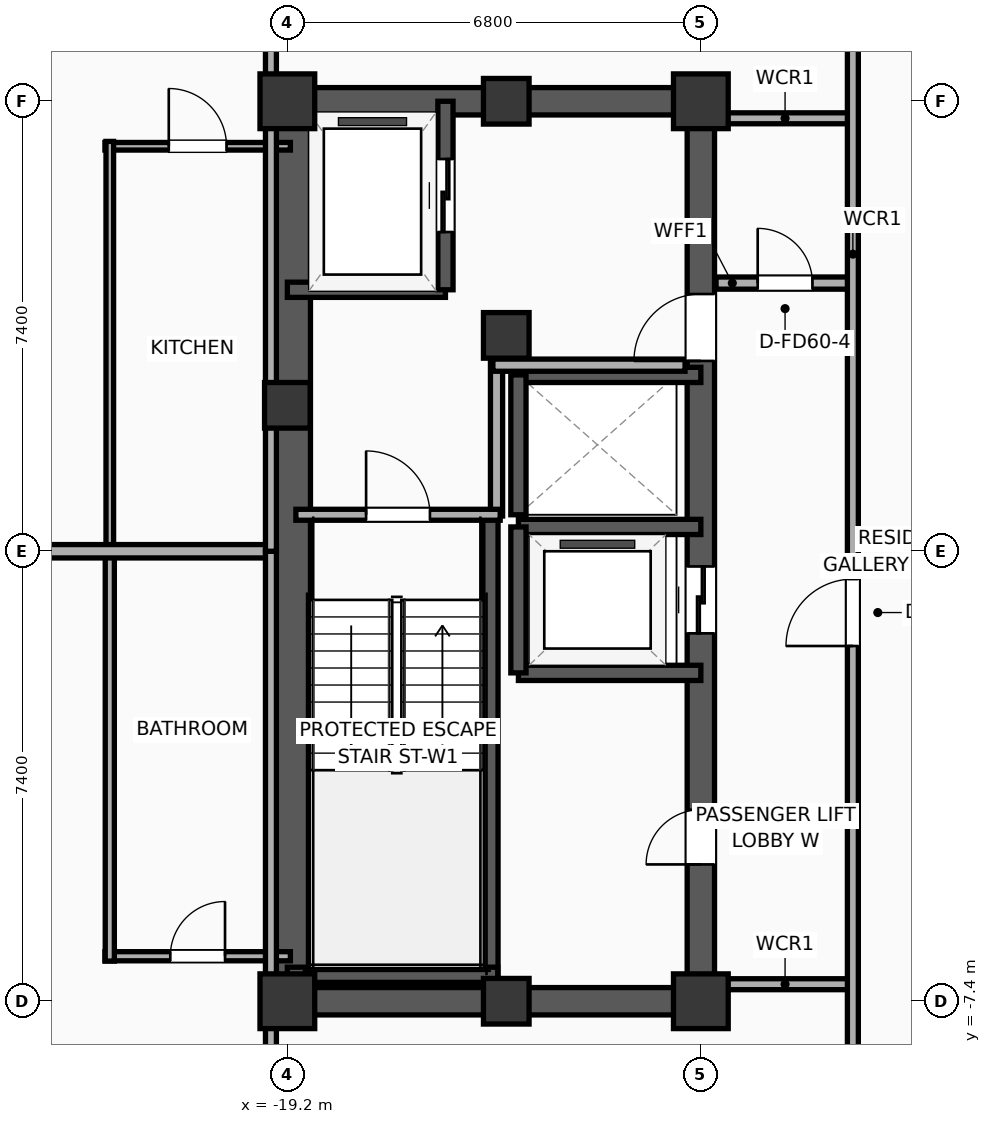
"""IFC4 building model, lengths in metres.
Left out: names, types, materials, properties, quantities, classifications, styles, units other than length and angle.
Written with IfcOpenShell. Run it as: python <this file> out.ifc"""

import sys

from ifc_helpers import new_model, si_unit, direction, frame, frame_2d, origin, origin_2d, place, context, subcontext, project, spatial, rectangle, extrude, element, fill, save


model = new_model("IFC4")
c1 = context("Model", 3, precision=1e-05, world=origin(), true_north=direction((0.0, 1.0)))
c2 = subcontext(c1, "Body", "Model", "MODEL_VIEW")
j1 = project(units=[si_unit("LENGTHUNIT", "METRE"), si_unit("PLANEANGLEUNIT", "RADIAN")], contexts=[c1])
p1 = place(None, origin())
s1 = spatial("IfcSite", under=j1, at=p1, CompositionType="ELEMENT")
p2 = place(p1, origin())
s2 = spatial("IfcBuilding", under=s1, at=p2, CompositionType="ELEMENT")
p3 = place(p2, frame((0.0, 0.0, 171.6)))
s3 = spatial("IfcBuildingStorey", under=s2, at=p3, CompositionType="ELEMENT", Elevation=171.6)
p4 = place(p3, frame((-19.2, -7.4, 0.0), z_axis=(0.0, 0.0, 1.0), x_axis=(1.0, 0.0, 0.0)))
e1 = element("IfcColumn", 1, at=p4, inside=s3, PredefinedType="COLUMN", context=c2, shape_type="SweptSolid", body=[
    extrude(rectangle(XDim=0.9, YDim=0.9, at=origin_2d()), origin(), (0.0, 0.0, 1.0), 3.9),
])
p5 = place(p3, frame((-19.2, 2.4, 0.0), z_axis=(0.0, 0.0, 1.0), x_axis=(1.0, 0.0, 0.0)))
e2 = element("IfcColumn", 2, at=p5, inside=s3, PredefinedType="COLUMN", context=c2, shape_type="SweptSolid", body=[
    extrude(rectangle(XDim=0.75, YDim=0.75, at=origin_2d()), origin(), (0.0, 0.0, 1.0), 3.9),
])
p6 = place(p3, frame((-19.2, 7.4, 0.0), z_axis=(0.0, 0.0, 1.0), x_axis=(1.0, 0.0, 0.0)))
e3 = element("IfcColumn", 3, at=p6, inside=s3, PredefinedType="COLUMN", context=c2, shape_type="SweptSolid", body=[
    extrude(rectangle(XDim=0.9, YDim=0.9, at=origin_2d()), origin(), (0.0, 0.0, 1.0), 3.9),
])
for number, where, z_axis, x_axis in (
    (4, (-15.6, -7.4, 0.0), (0.0, 0.0, 1.0), (1.0, 0.0, 0.0)),
    (5, (-15.6, 7.4, 0.0), (0.0, 0.0, 1.0), (1.0, 0.0, 0.0)),
):
    element("IfcColumn", number, at=place(p3, frame(where, z_axis=z_axis, x_axis=x_axis)), inside=s3, PredefinedType="COLUMN", context=c2, shape_type="SweptSolid", body=[
        extrude(rectangle(XDim=0.75, YDim=0.75, at=origin_2d()), origin(), (0.0, 0.0, 1.0), 3.9),
    ])
p7 = place(p3, frame((-12.4, -7.4, 0.0), z_axis=(0.0, 0.0, 1.0), x_axis=(1.0, 0.0, 0.0)))
e6 = element("IfcColumn", 6, at=p7, inside=s3, PredefinedType="COLUMN", context=c2, shape_type="SweptSolid", body=[
    extrude(rectangle(XDim=0.9, YDim=0.9, at=origin_2d()), origin(), (0.0, 0.0, 1.0), 3.9),
])
p8 = place(p3, frame((-15.6, 3.55, 0.0), z_axis=(0.0, 0.0, 1.0), x_axis=(1.0, 0.0, 0.0)))
e7 = element("IfcColumn", 7, at=p8, inside=s3, PredefinedType="COLUMN", context=c2, shape_type="SweptSolid", body=[
    extrude(rectangle(XDim=0.75, YDim=0.75, at=origin_2d()), origin(), (0.0, 0.0, 1.0), 3.9),
])
p9 = place(p3, frame((-12.4, 7.4, 0.0), z_axis=(0.0, 0.0, 1.0), x_axis=(1.0, 0.0, 0.0)))
e8 = element("IfcColumn", 8, at=p9, inside=s3, PredefinedType="COLUMN", context=c2, shape_type="SweptSolid", body=[
    extrude(rectangle(XDim=0.9, YDim=0.9, at=origin_2d()), origin(), (0.0, 0.0, 1.0), 3.9),
])
for number, where, z_axis, x_axis in (
    (9, (-19.425, -7.4, 0.0), (0.0, 0.0, 1.0), (1.0, 0.0, 0.0)),
    (10, (-19.425, 7.4, 0.0), (0.0, 0.0, 1.0), (1.0, 0.0, 0.0)),
):
    element("IfcWall", number, at=place(p3, frame(where, z_axis=z_axis, x_axis=x_axis)), inside=s3, PredefinedType="SHEAR", context=c2, shape_type="SweptSolid", body=[
        extrude(rectangle(XDim=7.25, YDim=0.45, at=frame_2d((3.625, 0.0))), origin(), (0.0, 0.0, 1.0), 3.65),
    ])
p10 = place(p3, frame((-19.145, -7.4, 0.0), z_axis=(0.0, 0.0, 1.0), x_axis=(0.0, 1.0, 0.0)))
e11 = element("IfcWall", 11, at=p10, inside=s3, PredefinedType="SHEAR", context=c2, shape_type="SweptSolid", body=[
    extrude(rectangle(XDim=14.8, YDim=0.65, at=frame_2d((7.4, 0.0))), origin(), (0.0, 0.0, 1.0), 3.65),
])
p11 = place(p3, frame((-12.4, -7.4, 0.0), z_axis=(0.0, 0.0, 1.0), x_axis=(0.0, 1.0, 0.0)))
e12 = element("IfcWall", 12, at=p11, inside=s3, PredefinedType="SHEAR", context=c2, shape_type="SweptSolid", body=[
    extrude(rectangle(XDim=14.8, YDim=0.45, at=frame_2d((7.4, 0.0))), origin(), (0.0, 0.0, 1.0), 3.65),
])
p12 = place(p11, frame((6.05, 0.0, 0.0)))
e13 = element("IfcOpeningElement", 13, at=p12, cuts=e12, PredefinedType="OPENING", context=c2, shape_type="SweptSolid", body=[
    extrude(rectangle(XDim=1.1, YDim=2.05, at=frame_2d((0.55, 1.025))), frame((0.0, 0.235, 0.0), z_axis=(0.0, -1.0, 0.0), x_axis=(1.0, 0.0, 0.0)), (0.0, 0.0, 1.0), 0.47),
])
p13 = place(p11, frame((10.53, 0.0, 0.0)))
e14 = element("IfcOpeningElement", 14, at=p13, cuts=e12, PredefinedType="OPENING", context=c2, shape_type="SweptSolid", body=[
    extrude(rectangle(XDim=1.1, YDim=2.05, at=frame_2d((0.55, 1.025))), frame((0.0, 0.235, 0.0), z_axis=(0.0, -1.0, 0.0), x_axis=(1.0, 0.0, 0.0)), (0.0, 0.0, 1.0), 0.47),
])
p14 = place(p11, frame((2.25, 0.0, 0.0)))
e15 = element("IfcOpeningElement", 15, at=p14, cuts=e12, PredefinedType="OPENING", context=c2, shape_type="SweptSolid", body=[
    extrude(rectangle(XDim=0.9, YDim=2.05, at=frame_2d((0.45, 1.025))), frame((0.0, 0.235, 0.0), z_axis=(0.0, -1.0, 0.0), x_axis=(1.0, 0.0, 0.0)), (0.0, 0.0, 1.0), 0.47),
])
p15 = place(p3, frame((-15.86, -7.085, 0.0), z_axis=(0.0, 0.0, 1.0), x_axis=(0.0, 1.0, 0.0)))
e16 = element("IfcWall", 16, at=p15, inside=s3, PredefinedType="SOLIDWALL", context=c2, shape_type="SweptSolid", body=[
    extrude(rectangle(XDim=7.685, YDim=0.25, at=frame_2d((3.843, 0.0))), origin(), (0.0, 0.0, 1.0), 3.65),
])
p16 = place(p3, frame((-19.2, -6.965, 0.0), z_axis=(0.0, 0.0, 1.0), x_axis=(1.0, 0.0, 0.0)))
e17 = element("IfcWall", 17, at=p16, inside=s3, PredefinedType="SOLIDWALL", context=c2, shape_type="SweptSolid", body=[
    extrude(rectangle(XDim=3.46, YDim=0.25, at=frame_2d((1.73, 0.0))), origin(), (0.0, 0.0, 1.0), 3.65),
])
p17 = place(p3, frame((-19.2, 4.3, 0.0), z_axis=(0.0, 0.0, 1.0), x_axis=(1.0, 0.0, 0.0)))
e18 = element("IfcWall", 18, at=p17, inside=s3, PredefinedType="SOLIDWALL", context=c2, shape_type="SweptSolid", body=[
    extrude(rectangle(XDim=2.6, YDim=0.25, at=frame_2d((1.3, 0.0))), origin(), (0.0, 0.0, 1.0), 3.65),
])
p18 = place(p3, frame((-16.6, 4.3, 0.0), z_axis=(0.0, 0.0, 1.0), x_axis=(0.0, 1.0, 0.0)))
e19 = element("IfcWall", 19, at=p18, inside=s3, PredefinedType="SOLIDWALL", context=c2, shape_type="SweptSolid", body=[
    extrude(rectangle(XDim=3.1, YDim=0.25, at=frame_2d((1.55, 0.0))), origin(), (0.0, 0.0, 1.0), 3.65),
])
p19 = place(p18, frame((0.95, 0.0, 0.0)))
e20 = element("IfcOpeningElement", 20, at=p19, cuts=e19, PredefinedType="OPENING", context=c2, shape_type="SweptSolid", body=[
    extrude(rectangle(XDim=1.2, YDim=2.05, at=frame_2d((0.6, 1.025))), frame((0.0, 0.135, 0.0), z_axis=(0.0, -1.0, 0.0), x_axis=(1.0, 0.0, 0.0)), (0.0, 0.0, 1.0), 0.27),
])
for number, where, z_axis, x_axis in (
    (21, (-15.4, -2.0, 0.0), (0.0, 0.0, 1.0), (1.0, 0.0, 0.0)),
    (22, (-12.4, 0.4, 0.0), (0.0, 0.0, 1.0), (-1.0, 0.0, 0.0)),
):
    element("IfcWall", number, at=place(p3, frame(where, z_axis=z_axis, x_axis=x_axis)), inside=s3, PredefinedType="SOLIDWALL", context=c2, shape_type="SweptSolid", body=[
        extrude(rectangle(XDim=3.0, YDim=0.25, at=frame_2d((1.5, 0.0))), origin(), (0.0, 0.0, 1.0), 3.65),
    ])
p20 = place(p3, frame((-15.4, 0.4, 0.0), z_axis=(0.0, 0.0, 1.0), x_axis=(0.0, -1.0, 0.0)))
e23 = element("IfcWall", 23, at=p20, inside=s3, PredefinedType="SOLIDWALL", context=c2, shape_type="SweptSolid", body=[
    extrude(rectangle(XDim=2.4, YDim=0.25, at=frame_2d((1.2, 0.0))), origin(), (0.0, 0.0, 1.0), 3.65),
])
p21 = place(p3, frame((-12.4, 2.9, 0.0), z_axis=(0.0, 0.0, 1.0), x_axis=(-1.0, 0.0, 0.0)))
e24 = element("IfcWall", 24, at=p21, inside=s3, PredefinedType="SOLIDWALL", context=c2, shape_type="SweptSolid", body=[
    extrude(rectangle(XDim=3.0, YDim=0.25, at=frame_2d((1.5, 0.0))), origin(), (0.0, 0.0, 1.0), 3.65),
])
p22 = place(p3, frame((-15.4, 2.9, 0.0), z_axis=(0.0, 0.0, 1.0), x_axis=(0.0, -1.0, 0.0)))
e25 = element("IfcWall", 25, at=p22, inside=s3, PredefinedType="SOLIDWALL", context=c2, shape_type="SweptSolid", body=[
    extrude(rectangle(XDim=2.3, YDim=0.25, at=frame_2d((1.15, 0.0))), origin(), (0.0, 0.0, 1.0), 3.65),
])
p23 = place(p3, frame((-15.76, 0.58, 0.0), z_axis=(0.0, 0.0, 1.0), x_axis=(0.0, 1.0, 0.0)))
e26 = element("IfcWall", 26, at=p23, inside=s3, PredefinedType="PARTITIONING", context=c2, shape_type="SweptSolid", body=[
    extrude(rectangle(XDim=2.52, YDim=0.2, at=frame_2d((1.26, 0.0))), origin(), (0.0, 0.0, 1.0), 3.65),
])
p24 = place(p3, frame((-15.82, 3.06, 0.0), z_axis=(0.0, 0.0, 1.0), x_axis=(1.0, 0.0, 0.0)))
e27 = element("IfcWall", 27, at=p24, inside=s3, PredefinedType="PARTITIONING", context=c2, shape_type="SweptSolid", body=[
    extrude(rectangle(XDim=3.16, YDim=0.2, at=frame_2d((1.58, 0.0))), origin(), (0.0, 0.0, 1.0), 3.65),
])
p25 = place(p3, frame((-19.06, 0.6, 0.0), z_axis=(0.0, 0.0, 1.0), x_axis=(1.0, 0.0, 0.0)))
e28 = element("IfcWall", 28, at=p25, inside=s3, PredefinedType="PARTITIONING", context=c2, shape_type="SweptSolid", body=[
    extrude(rectangle(XDim=3.36, YDim=0.18, at=frame_2d((1.68, 0.0))), origin(), (0.0, 0.0, 1.0), 3.65),
])
p26 = place(p25, frame((1.155, 0.0, 0.0)))
e29 = element("IfcOpeningElement", 29, at=p26, cuts=e28, PredefinedType="OPENING", context=c2, shape_type="SweptSolid", body=[
    extrude(rectangle(XDim=1.05, YDim=2.05, at=frame_2d((0.525, 1.025))), frame((0.0, 0.1, 0.0), z_axis=(0.0, -1.0, 0.0), x_axis=(1.0, 0.0, 0.0)), (0.0, 0.0, 1.0), 0.2),
])
p27 = place(p3, frame((-12.15, 4.41, 0.0), z_axis=(0.0, 0.0, 1.0), x_axis=(1.0, 0.0, 0.0)))
e30 = element("IfcWall", 30, at=p27, inside=s3, PredefinedType="PARTITIONING", context=c2, shape_type="SweptSolid", body=[
    extrude(rectangle(XDim=2.27, YDim=0.2, at=frame_2d((1.135, 0.0))), origin(), (0.0, 0.0, 1.0), 3.65),
])
p28 = place(p27, frame((0.685, 0.0, 0.0)))
e31 = element("IfcOpeningElement", 31, at=p28, cuts=e30, PredefinedType="OPENING", context=c2, shape_type="SweptSolid", body=[
    extrude(rectangle(XDim=0.9, YDim=2.05, at=frame_2d((0.45, 1.025))), frame((0.0, 0.11, 0.0), z_axis=(0.0, -1.0, 0.0), x_axis=(1.0, 0.0, 0.0)), (0.0, 0.0, 1.0), 0.22),
])
for number, where, z_axis, x_axis in (
    (32, (-12.15, 7.12, 0.0), (0.0, 0.0, 1.0), (1.0, 0.0, 0.0)),
    (33, (-12.15, -7.12, 0.0), (0.0, 0.0, 1.0), (1.0, 0.0, 0.0)),
):
    element("IfcWall", number, at=place(p3, frame(where, z_axis=z_axis, x_axis=x_axis)), inside=s3, PredefinedType="PARTITIONING", context=c2, shape_type="SweptSolid", body=[
        extrude(rectangle(XDim=2.27, YDim=0.18, at=frame_2d((1.135, 0.0))), origin(), (0.0, 0.0, 1.0), 3.65),
    ])
p29 = place(p3, frame((-9.9, -10.08, 0.0), z_axis=(0.0, 0.0, 1.0), x_axis=(0.0, 1.0, 0.0)))
e34 = element("IfcWall", 34, at=p29, inside=s3, PredefinedType="PARTITIONING", context=c2, shape_type="SweptSolid", body=[
    extrude(rectangle(XDim=20.16, YDim=0.18, at=frame_2d((10.08, 0.0))), origin(), (0.0, 0.0, 1.0), 3.65),
])
p30 = place(p29, frame((8.522, 0.0, 0.0)))
e35 = element("IfcOpeningElement", 35, at=p30, cuts=e34, PredefinedType="OPENING", context=c2, shape_type="SweptSolid", body=[
    extrude(rectangle(XDim=1.1, YDim=2.05, at=frame_2d((0.55, 1.025))), frame((0.0, 0.1, 0.0), z_axis=(0.0, -1.0, 0.0), x_axis=(1.0, 0.0, 0.0)), (0.0, 0.0, 1.0), 0.2),
])
p31 = place(p3, frame((-22.2, -6.66, 0.0), z_axis=(0.0, 0.0, 1.0), x_axis=(1.0, 0.0, 0.0)))
e36 = element("IfcWall", 36, at=p31, inside=s3, PredefinedType="PLUMBINGWALL", context=c2, shape_type="SweptSolid", body=[
    extrude(rectangle(XDim=3.05, YDim=0.15, at=frame_2d((1.525, 0.0))), origin(), (0.0, 0.0, 1.0), 3.65),
])
p32 = place(p31, frame((1.075, 0.0, 0.0)))
e37 = element("IfcOpeningElement", 37, at=p32, cuts=e36, PredefinedType="OPENING", context=c2, shape_type="SweptSolid", body=[
    extrude(rectangle(XDim=0.9, YDim=2.05, at=frame_2d((0.45, 1.025))), frame((0.0, 0.085, 0.0), z_axis=(0.0, -1.0, 0.0), x_axis=(1.0, 0.0, 0.0)), (0.0, 0.0, 1.0), 0.17),
])
p33 = place(p3, frame((-22.12, -6.74, 0.0), z_axis=(0.0, 0.0, 1.0), x_axis=(0.0, 1.0, 0.0)))
e38 = element("IfcWall", 38, at=p33, inside=s3, PredefinedType="PLUMBINGWALL", context=c2, shape_type="SweptSolid", body=[
    extrude(rectangle(XDim=6.72, YDim=0.15, at=frame_2d((3.36, 0.0))), origin(), (0.0, 0.0, 1.0), 3.65),
])
p34 = place(p3, frame((-22.2, 6.66, 0.0), z_axis=(0.0, 0.0, 1.0), x_axis=(1.0, 0.0, 0.0)))
e39 = element("IfcWall", 39, at=p34, inside=s3, PredefinedType="PARTITIONING", context=c2, shape_type="SweptSolid", body=[
    extrude(rectangle(XDim=3.05, YDim=0.125, at=frame_2d((1.525, 0.0))), origin(), (0.0, 0.0, 1.0), 3.04),
])
p35 = place(p34, frame((1.05, 0.0, 0.0)))
e40 = element("IfcOpeningElement", 40, at=p35, cuts=e39, PredefinedType="OPENING", context=c2, shape_type="SweptSolid", body=[
    extrude(rectangle(XDim=0.95, YDim=2.05, at=frame_2d((0.475, 1.025))), frame((0.0, 0.073, 0.0), z_axis=(0.0, -1.0, 0.0), x_axis=(1.0, 0.0, 0.0)), (0.0, 0.0, 1.0), 0.145),
])
p36 = place(p3, frame((-22.12, 0.02, 0.0), z_axis=(0.0, 0.0, 1.0), x_axis=(0.0, 1.0, 0.0)))
e41 = element("IfcWall", 41, at=p36, inside=s3, PredefinedType="PARTITIONING", context=c2, shape_type="SweptSolid", body=[
    extrude(rectangle(XDim=6.72, YDim=0.125, at=frame_2d((3.36, 0.0))), origin(), (0.0, 0.0, 1.0), 3.65),
])
p37 = place(p3, frame((-19.47, 0.0, 0.0), z_axis=(0.0, 0.0, 1.0), x_axis=(-1.0, 0.0, 0.0)))
e42 = element("IfcWall", 42, at=p37, inside=s3, PredefinedType="PARTITIONING", context=c2, shape_type="SweptSolid", body=[
    extrude(rectangle(XDim=13.586, YDim=0.22, at=frame_2d((6.793, 0.0))), origin(), (0.0, 0.0, 1.0), 3.65),
])
p38 = place(p3, frame((-19.47, -22.652, 0.0), z_axis=(0.0, 0.0, 1.0), x_axis=(0.0, 1.0, 0.0)))
e43 = element("IfcWall", 43, at=p38, inside=s3, PredefinedType="PARTITIONING", context=c2, shape_type="SweptSolid", body=[
    extrude(rectangle(XDim=22.652, YDim=0.18, at=frame_2d((11.326, 0.0))), origin(), (0.0, 0.0, 1.0), 3.65),
])
p39 = place(p38, frame((11.471, 0.0, 0.0)))
e44 = element("IfcOpeningElement", 44, at=p39, cuts=e43, PredefinedType="OPENING", context=c2, shape_type="SweptSolid", body=[
    extrude(rectangle(XDim=0.9, YDim=2.05, at=frame_2d((0.45, 1.025))), frame((0.0, 0.1, 0.0), z_axis=(0.0, -1.0, 0.0), x_axis=(1.0, 0.0, 0.0)), (0.0, 0.0, 1.0), 0.2),
])
p40 = place(p3, frame((-19.47, 0.0, 0.0), z_axis=(0.0, 0.0, 1.0), x_axis=(0.0, 1.0, 0.0)))
e45 = element("IfcWall", 45, at=p40, inside=s3, PredefinedType="PARTITIONING", context=c2, shape_type="SweptSolid", body=[
    extrude(rectangle(XDim=18.031, YDim=0.18, at=frame_2d((9.016, 0.0))), origin(), (0.0, 0.0, 1.0), 3.04),
])
p41 = place(p40, frame((10.281, 0.0, 0.0)))
e46 = element("IfcOpeningElement", 46, at=p41, cuts=e45, PredefinedType="OPENING", context=c2, shape_type="SweptSolid", body=[
    extrude(rectangle(XDim=0.9, YDim=2.05, at=frame_2d((0.45, 1.025))), frame((0.0, 0.1, 0.0), z_axis=(0.0, -1.0, 0.0), x_axis=(1.0, 0.0, 0.0)), (0.0, 0.0, 1.0), 0.2),
])
p42 = place(p19, origin())
e47 = element("IfcDoor", 47, at=p42, inside=s3, OperationType="SLIDING_TO_LEFT", PredefinedType="DOOR", context=c2, shape_type="SweptSolid", body=[
    extrude(rectangle(XDim=1.2, YDim=2.05, at=frame_2d((0.6, 1.025))), frame((0.0, 0.025, 0.0), z_axis=(0.0, -1.0, 0.0), x_axis=(1.0, 0.0, 0.0)), (0.0, 0.0, 1.0), 0.05),
])
fill(e20, e47)
p43 = place(p12, origin())
e48 = element("IfcDoor", 48, at=p43, inside=s3, OperationType="SLIDING_TO_LEFT", PredefinedType="DOOR", context=c2, shape_type="SweptSolid", body=[
    extrude(rectangle(XDim=1.1, YDim=2.05, at=frame_2d((0.55, 1.025))), frame((0.0, 0.025, 0.0), z_axis=(0.0, -1.0, 0.0), x_axis=(1.0, 0.0, 0.0)), (0.0, 0.0, 1.0), 0.05),
])
fill(e13, e48)
p44 = place(p26, origin())
e49 = element("IfcDoor", 49, at=p44, inside=s3, OperationType="SINGLE_SWING_LEFT", PredefinedType="DOOR", context=c2, shape_type="SweptSolid", body=[
    extrude(rectangle(XDim=1.05, YDim=2.05, at=frame_2d((0.525, 1.025))), frame((0.0, 0.025, 0.0), z_axis=(0.0, -1.0, 0.0), x_axis=(1.0, 0.0, 0.0)), (0.0, 0.0, 1.0), 0.05),
])
fill(e29, e49)
p45 = place(p28, origin())
e50 = element("IfcDoor", 50, at=p45, inside=s3, OperationType="SINGLE_SWING_LEFT", PredefinedType="DOOR", context=c2, shape_type="SweptSolid", body=[
    extrude(rectangle(XDim=0.9, YDim=2.05, at=frame_2d((0.45, 1.025))), frame((0.0, 0.025, 0.0), z_axis=(0.0, -1.0, 0.0), x_axis=(1.0, 0.0, 0.0)), (0.0, 0.0, 1.0), 0.05),
])
fill(e31, e50)
p46 = place(p30, origin())
e51 = element("IfcDoor", 51, at=p46, inside=s3, OperationType="SINGLE_SWING_LEFT", PredefinedType="DOOR", context=c2, shape_type="SweptSolid", body=[
    extrude(rectangle(XDim=1.1, YDim=2.05, at=frame_2d((0.55, 1.025))), frame((0.0, 0.025, 0.0), z_axis=(0.0, -1.0, 0.0), x_axis=(1.0, 0.0, 0.0)), (0.0, 0.0, 1.0), 0.05),
])
fill(e35, e51)
p47 = place(p32, origin())
e52 = element("IfcDoor", 52, at=p47, inside=s3, OperationType="SINGLE_SWING_RIGHT", PredefinedType="DOOR", context=c2, shape_type="SweptSolid", body=[
    extrude(rectangle(XDim=0.9, YDim=2.05, at=frame_2d((0.45, 1.025))), frame((0.0, 0.025, 0.0), z_axis=(0.0, -1.0, 0.0), x_axis=(1.0, 0.0, 0.0)), (0.0, 0.0, 1.0), 0.05),
])
fill(e37, e52)
p48 = place(p35, origin())
e53 = element("IfcDoor", 53, at=p48, inside=s3, OperationType="SINGLE_SWING_LEFT", PredefinedType="DOOR", context=c2, shape_type="SweptSolid", body=[
    extrude(rectangle(XDim=0.95, YDim=2.05, at=frame_2d((0.475, 1.025))), frame((0.0, 0.025, 0.0), z_axis=(0.0, -1.0, 0.0), x_axis=(1.0, 0.0, 0.0)), (0.0, 0.0, 1.0), 0.05),
])
fill(e40, e53)
p49 = place(p13, origin())
e54 = element("IfcDoor", 54, at=p49, inside=s3, OperationType="SINGLE_SWING_LEFT", PredefinedType="DOOR", context=c2, shape_type="SweptSolid", body=[
    extrude(rectangle(XDim=1.1, YDim=2.05, at=frame_2d((0.55, 1.025))), frame((0.0, 0.025, 0.0), z_axis=(0.0, -1.0, 0.0), x_axis=(1.0, 0.0, 0.0)), (0.0, 0.0, 1.0), 0.05),
])
fill(e14, e54)
p50 = place(p14, origin())
e55 = element("IfcDoor", 55, at=p50, inside=s3, OperationType="SINGLE_SWING_LEFT", PredefinedType="DOOR", context=c2, shape_type="SweptSolid", body=[
    extrude(rectangle(XDim=0.9, YDim=2.05, at=frame_2d((0.45, 1.025))), frame((0.0, 0.025, 0.0), z_axis=(0.0, -1.0, 0.0), x_axis=(1.0, 0.0, 0.0)), (0.0, 0.0, 1.0), 0.05),
])
fill(e15, e55)
save(model, sys.argv[1])
